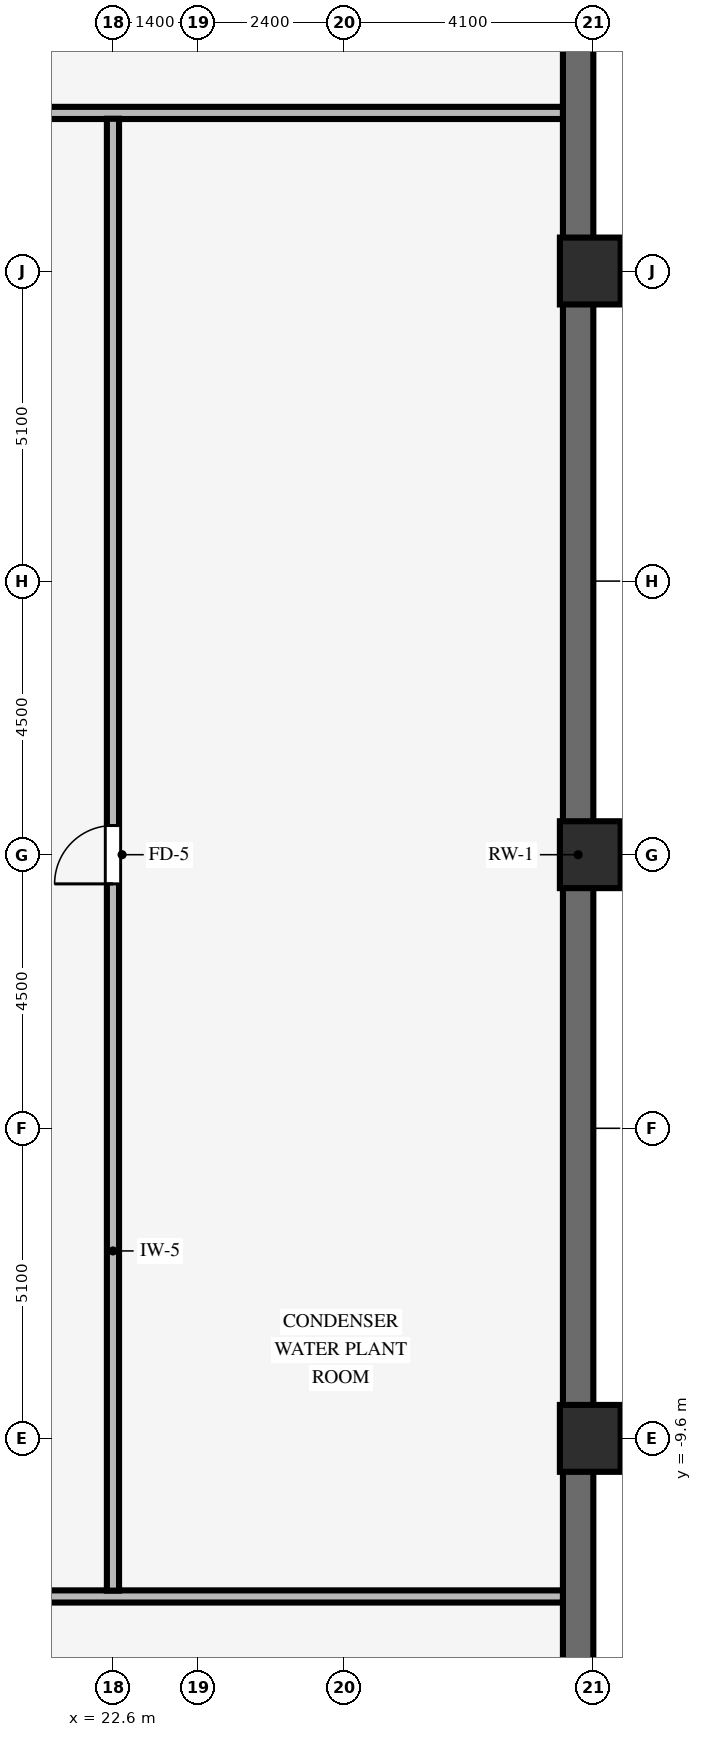
"""IFC4 building model, lengths in metres.
Left out: names, types, materials, properties, quantities, classifications, styles, units other than length and angle.
Written with IfcOpenShell. Run it as: python <this file> out.ifc"""

import sys

from ifc_helpers import new_model, si_unit, direction, frame, frame_2d, origin, origin_2d, place, context, subcontext, project, spatial, rectangle, extrude, source, transform, mapped, element, fill, save


model = new_model("IFC4")
c1 = context("Model", 3, precision=1e-05, world=origin(), true_north=direction((0.0, 1.0)))
c2 = subcontext(c1, "Body", "Model", "MODEL_VIEW")
j1 = project(units=[si_unit("LENGTHUNIT", "METRE"), si_unit("PLANEANGLEUNIT", "RADIAN")], contexts=[c1])
p1 = place(None, origin())
s1 = spatial("IfcSite", under=j1, at=p1, CompositionType="ELEMENT")
p2 = place(p1, origin())
s2 = spatial("IfcBuilding", under=s1, at=p2, CompositionType="ELEMENT")
p3 = place(p2, frame((0.0, 0.0, -8.4)))
s3 = spatial("IfcBuildingStorey", under=s2, at=p3, CompositionType="ELEMENT", Elevation=-8.4)
p4 = place(p3, frame((30.25, -25.505, 0.0), z_axis=(0.0, 0.0, 1.0), x_axis=(0.0, 1.0, 0.0)))
e1 = element("IfcWall", 1, at=p4, inside=s3, PredefinedType="SOLIDWALL", context=c2, shape_type="SweptSolid", body=[
    extrude(rectangle(XDim=51.01, YDim=0.5, at=frame_2d((25.505, 0.0))), origin(), (0.0, 0.0, 1.0), 3.85),
])
for number, where, z_axis, x_axis in (
    (2, (30.5, -9.6, 0.0), (0.0, 0.0, 1.0), (1.0, 0.0, 0.0)),
    (3, (30.5, 0.0, 0.0), (0.0, 0.0, 1.0), (1.0, 0.0, 0.0)),
    (4, (30.5, 9.6, 0.0), (0.0, 0.0, 1.0), (1.0, 0.0, 0.0)),
):
    element("IfcColumn", number, at=place(p3, frame(where, z_axis=z_axis, x_axis=x_axis)), inside=s3, PredefinedType="COLUMN", context=c2, shape_type="SweptSolid", body=[
        extrude(rectangle(XDim=1.1, YDim=1.1, at=origin_2d()), origin(), (0.0, 0.0, 1.0), 3.85),
    ])
p5 = place(p3, frame((-30.0, -12.2, 0.0), z_axis=(0.0, 0.0, 1.0), x_axis=(1.0, 0.0, 0.0)))
e5 = element("IfcWall", 5, at=p5, inside=s3, PredefinedType="STANDARD", context=c2, shape_type="SweptSolid", body=[
    extrude(rectangle(XDim=60.0, YDim=0.2, at=frame_2d((30.0, 0.0))), origin(), (0.0, 0.0, 1.0), 3.84),
])
p6 = place(p5, frame((15.12, 0.0, 0.0)))
e6 = element("IfcOpeningElement", 6, at=p6, cuts=e5, PredefinedType="OPENING", context=c2, shape_type="SweptSolid", body=[
    extrude(rectangle(XDim=0.96, YDim=2.1, at=frame_2d((0.48, 1.05))), frame((0.0, 0.11, 0.0), z_axis=(0.0, -1.0, 0.0), x_axis=(1.0, 0.0, 0.0)), (0.0, 0.0, 1.0), 0.22),
])
p7 = place(p5, frame((43.92, 0.0, 0.0)))
e7 = element("IfcOpeningElement", 7, at=p7, cuts=e5, PredefinedType="OPENING", context=c2, shape_type="SweptSolid", body=[
    extrude(rectangle(XDim=0.96, YDim=2.1, at=frame_2d((0.48, 1.05))), frame((0.0, 0.11, 0.0), z_axis=(0.0, -1.0, 0.0), x_axis=(1.0, 0.0, 0.0)), (0.0, 0.0, 1.0), 0.22),
])
p8 = place(p3, frame((-30.0, 12.2, 0.0), z_axis=(0.0, 0.0, 1.0), x_axis=(1.0, 0.0, 0.0)))
e8 = element("IfcWall", 8, at=p8, inside=s3, PredefinedType="STANDARD", context=c2, shape_type="SweptSolid", body=[
    extrude(rectangle(XDim=60.0, YDim=0.2, at=frame_2d((30.0, 0.0))), origin(), (0.0, 0.0, 1.0), 3.84),
])
p9 = place(p8, frame((15.12, 0.0, 0.0)))
e9 = element("IfcOpeningElement", 9, at=p9, cuts=e8, PredefinedType="OPENING", context=c2, shape_type="SweptSolid", body=[
    extrude(rectangle(XDim=0.96, YDim=2.1, at=frame_2d((0.48, 1.05))), frame((0.0, 0.11, 0.0), z_axis=(0.0, -1.0, 0.0), x_axis=(1.0, 0.0, 0.0)), (0.0, 0.0, 1.0), 0.22),
])
p10 = place(p8, frame((43.92, 0.0, 0.0)))
e10 = element("IfcOpeningElement", 10, at=p10, cuts=e8, PredefinedType="OPENING", context=c2, shape_type="SweptSolid", body=[
    extrude(rectangle(XDim=0.96, YDim=2.1, at=frame_2d((0.48, 1.05))), frame((0.0, 0.11, 0.0), z_axis=(0.0, -1.0, 0.0), x_axis=(1.0, 0.0, 0.0)), (0.0, 0.0, 1.0), 0.22),
])
p11 = place(p3, frame((22.6, -12.104, 0.0), z_axis=(0.0, 0.0, 1.0), x_axis=(0.0, 1.0, 0.0)))
e11 = element("IfcWall", 11, at=p11, inside=s3, PredefinedType="STANDARD", context=c2, shape_type="SweptSolid", body=[
    extrude(rectangle(XDim=24.208, YDim=0.2, at=frame_2d((12.104, 0.0))), origin(), (0.0, 0.0, 1.0), 3.84),
])
p12 = place(p11, frame((11.624, 0.0, 0.0)))
e12 = element("IfcOpeningElement", 12, at=p12, cuts=e11, PredefinedType="OPENING", context=c2, shape_type="SweptSolid", body=[
    extrude(rectangle(XDim=0.96, YDim=2.1, at=frame_2d((0.48, 1.05))), frame((0.0, 0.11, 0.0), z_axis=(0.0, -1.0, 0.0), x_axis=(1.0, 0.0, 0.0)), (0.0, 0.0, 1.0), 0.22),
])
m1 = source(origin(), c2, "Body", "SweptSolid", [
    extrude(rectangle(XDim=0.96, YDim=2.1, at=frame_2d((0.48, 1.05))), frame((0.0, 0.025, 0.0), z_axis=(0.0, -1.0, 0.0), x_axis=(1.0, 0.0, 0.0)), (0.0, 0.0, 1.0), 0.05),
])
p13 = place(p12, origin())
e13 = element("IfcDoor", 13, at=p13, inside=s3, OperationType="SINGLE_SWING_LEFT", PredefinedType="DOOR", context=c2, shape_type="MappedRepresentation", body=[
    mapped(m1, transform((0.0, 0.0, 0.0), scale=1.0)),
])
fill(e12, e13)
save(model, sys.argv[1])
